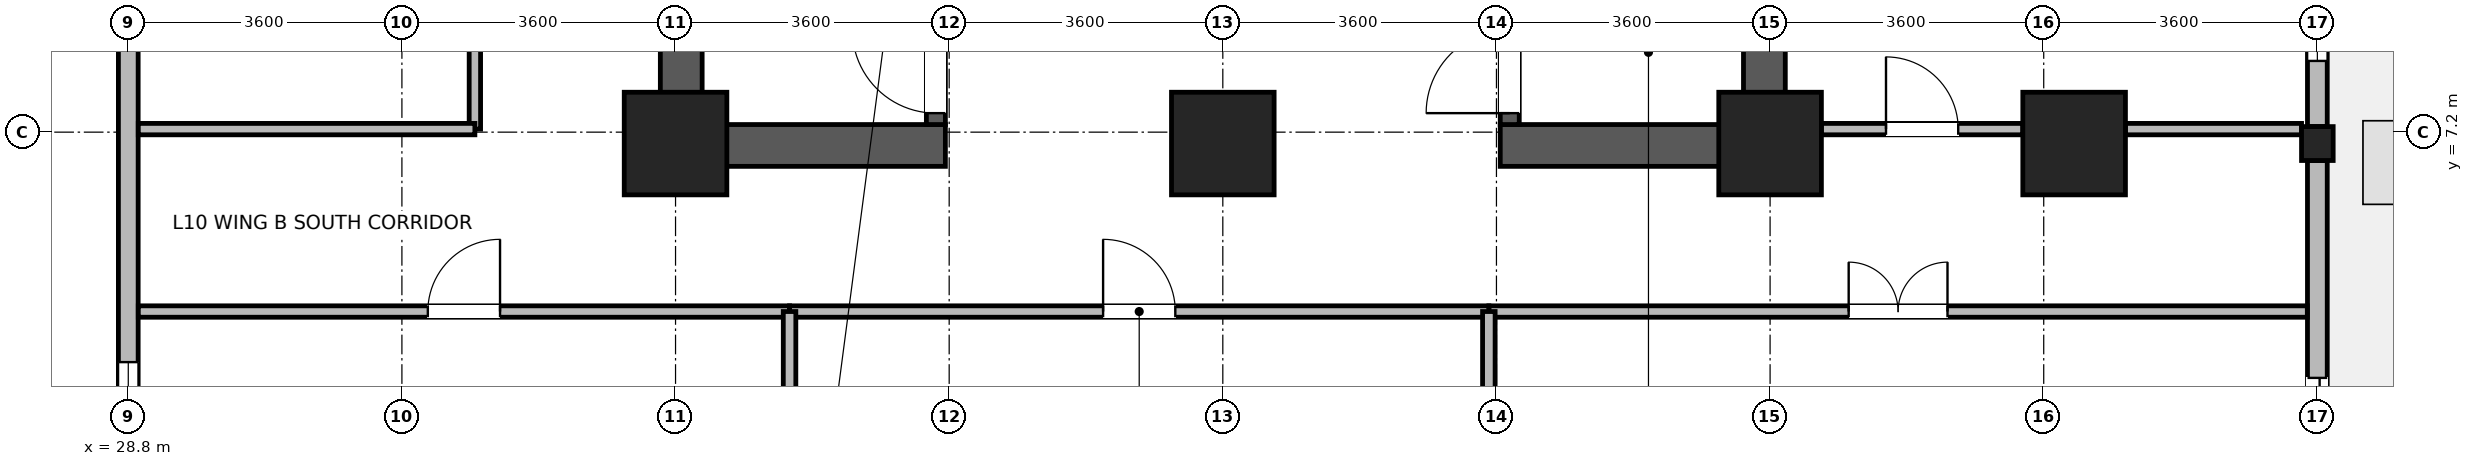
"""IFC4 building model, lengths in metres.
Left out: names, types, materials, properties, quantities, classifications, styles, units other than length and angle.
Written with IfcOpenShell. Run it as: python <this file> out.ifc"""

import sys

from ifc_helpers import new_model, si_unit, direction, frame, frame_2d, origin, origin_2d, place, context, subcontext, project, spatial, rectangle, i_section, extrude, source, transform, mapped, element, fill, save


model = new_model("IFC4")
c1 = context("Model", 3, precision=1e-05, world=origin(), true_north=direction((0.0, 1.0)))
c2 = subcontext(c1, "Body", "Model", "MODEL_VIEW")
j1 = project(units=[si_unit("LENGTHUNIT", "METRE"), si_unit("PLANEANGLEUNIT", "RADIAN")], contexts=[c1])
p1 = place(None, origin())
s1 = spatial("IfcSite", under=j1, at=p1, CompositionType="ELEMENT")
p2 = place(p1, origin())
s2 = spatial("IfcBuilding", under=s1, at=p2, CompositionType="ELEMENT")
p3 = place(p2, frame((0.0, 0.0, 43.8)))
s3 = spatial("IfcBuildingStorey", under=s2, at=p3, CompositionType="ELEMENT", Elevation=43.8)
for number, where, z_axis, x_axis in (
    (1, (36.075, 6.75, 0.0), (0.0, 0.0, 1.0), (0.0, 1.0, 0.0)),
    (2, (50.325, 6.75, 0.0), (0.0, 0.0, 1.0), (0.0, 1.0, 0.0)),
):
    element("IfcWall", number, at=place(p3, frame(where, z_axis=z_axis, x_axis=x_axis)), inside=s3, PredefinedType="SHEAR", context=c2, shape_type="SweptSolid", body=[
        extrude(rectangle(XDim=8.1, YDim=0.55, at=frame_2d((4.05, 0.0))), origin(), (0.0, 0.0, 1.0), 3.45),
    ])
for number, where, z_axis, x_axis in (
    (3, (36.35, 7.025, 0.0), (0.0, 0.0, 1.0), (1.0, 0.0, 0.0)),
    (4, (46.85, 7.025, 0.0), (0.0, 0.0, 1.0), (1.0, 0.0, 0.0)),
):
    element("IfcWall", number, at=place(p3, frame(where, z_axis=z_axis, x_axis=x_axis)), inside=s3, PredefinedType="SHEAR", context=c2, shape_type="SweptSolid", body=[
        extrude(rectangle(XDim=3.2, YDim=0.55, at=frame_2d((1.6, 0.0))), origin(), (0.0, 0.0, 1.0), 3.45),
    ])
p4 = place(p3, frame((39.425, 7.3, 0.0), z_axis=(0.0, 0.0, 1.0), x_axis=(0.0, 1.0, 0.0)))
e5 = element("IfcWall", 5, at=p4, inside=s3, PredefinedType="SHEAR", context=c2, shape_type="SweptSolid", body=[
    extrude(rectangle(XDim=7.0, YDim=0.25, at=frame_2d((3.5, 0.0))), origin(), (0.0, 0.0, 1.0), 3.45),
])
p5 = place(p4, frame((0.15, 0.0, 0.0)))
e6 = element("IfcOpeningElement", 6, at=p5, cuts=e5, PredefinedType="OPENING", context=c2, shape_type="SweptSolid", body=[
    extrude(rectangle(XDim=1.1, YDim=2.08, at=frame_2d((0.55, 1.04))), frame((0.0, 0.135, 0.0), z_axis=(0.0, -1.0, 0.0), x_axis=(1.0, 0.0, 0.0)), (0.0, 0.0, 1.0), 0.27),
])
p6 = place(p3, frame((46.975, 7.3, 0.0), z_axis=(0.0, 0.0, 1.0), x_axis=(0.0, 1.0, 0.0)))
e7 = element("IfcWall", 7, at=p6, inside=s3, PredefinedType="SHEAR", context=c2, shape_type="SweptSolid", body=[
    extrude(rectangle(XDim=7.0, YDim=0.25, at=frame_2d((3.5, 0.0))), origin(), (0.0, 0.0, 1.0), 3.45),
])
p7 = place(p6, frame((0.15, 0.0, 0.0)))
e8 = element("IfcOpeningElement", 8, at=p7, cuts=e7, PredefinedType="OPENING", context=c2, shape_type="SweptSolid", body=[
    extrude(rectangle(XDim=1.1, YDim=2.08, at=frame_2d((0.55, 1.04))), frame((0.0, 0.135, 0.0), z_axis=(0.0, -1.0, 0.0), x_axis=(1.0, 0.0, 0.0)), (0.0, 0.0, 1.0), 0.27),
])
m1 = source(origin(), c2, "Body", "SweptSolid", [
    extrude(rectangle(XDim=1.35, YDim=1.35, at=origin_2d()), origin(), (0.0, 0.0, 1.0), 3.7),
])
for number, where, z_axis, x_axis in (
    (9, (36.0, 7.05, 0.0), (0.0, 0.0, 1.0), (1.0, 0.0, 0.0)),
    (10, (43.2, 7.05, 0.0), (0.0, 0.0, 1.0), (1.0, 0.0, 0.0)),
    (11, (50.4, 7.05, 0.0), (0.0, 0.0, 1.0), (1.0, 0.0, 0.0)),
    (12, (54.4, 7.05, 0.0), (0.0, 0.0, 1.0), (1.0, 0.0, 0.0)),
):
    element("IfcColumn", number, at=place(p3, frame(where, z_axis=z_axis, x_axis=x_axis)), inside=s3, PredefinedType="COLUMN", context=c2, shape_type="MappedRepresentation", body=[
        mapped(m1, transform((0.0, 0.0, 0.0), x_axis=(1.0, 0.0, 0.0), y_axis=(0.0, 1.0, 0.0), z_axis=(0.0, 0.0, 1.0), scale=1.0)),
    ])
m2 = source(origin(), c2, "Body", "SweptSolid", [
    extrude(i_section(OverallWidth=0.416, OverallDepth=0.446, WebThickness=0.029, FlangeThickness=0.04, FilletRadius=0.015, at=origin_2d()), origin(), (0.0, 0.0, 1.0), 3.7),
])
p8 = place(p3, frame((57.6, 7.05, 0.0), z_axis=(0.0, 0.0, 1.0), x_axis=(1.0, 0.0, 0.0)))
e13 = element("IfcColumn", 13, at=p8, inside=s3, PredefinedType="COLUMN", context=c2, shape_type="MappedRepresentation", body=[
    mapped(m2, transform((0.0, 0.0, 0.0), x_axis=(1.0, 0.0, 0.0), y_axis=(0.0, 1.0, 0.0), z_axis=(0.0, 0.0, 1.0), scale=1.0)),
])
p9 = place(p3, frame((57.6, 6.826, 0.0), z_axis=(0.0, 0.0, 1.0), x_axis=(0.0, -1.0, 0.0)))
e14 = element("IfcWall", 14, at=p9, inside=s3, PredefinedType="STANDARD", context=c2, shape_type="SweptSolid", body=[
    extrude(rectangle(XDim=5.156, YDim=0.26, at=frame_2d((2.578, 0.0))), origin(), (0.0, 0.0, 1.0), 3.43),
])
p10 = place(p9, frame((2.859, 0.0, 0.0)))
e15 = element("IfcOpeningElement", 15, at=p10, cuts=e14, PredefinedType="OPENING", context=c2, shape_type="SweptSolid", body=[
    extrude(rectangle(XDim=1.5, YDim=2.15, at=frame_2d((0.75, 1.075))), frame((0.0, 0.14, 0.0), z_axis=(0.0, -1.0, 0.0), x_axis=(1.0, 0.0, 0.0)), (0.0, 0.0, 1.0), 0.28),
])
p11 = place(p3, frame((57.6, 14.326, 0.0), z_axis=(0.0, 0.0, 1.0), x_axis=(0.0, -1.0, 0.0)))
e16 = element("IfcWall", 16, at=p11, inside=s3, PredefinedType="STANDARD", context=c2, shape_type="SweptSolid", body=[
    extrude(rectangle(XDim=7.052, YDim=0.26, at=frame_2d((3.526, 0.0))), origin(), (0.0, 0.0, 1.0), 2.93),
])
p12 = place(p11, frame((0.863, 0.0, 0.85)))
e17 = element("IfcOpeningElement", 17, at=p12, cuts=e16, PredefinedType="OPENING", context=c2, shape_type="SweptSolid", body=[
    extrude(rectangle(XDim=1.8, YDim=1.85, at=frame_2d((0.9, 0.925))), frame((0.0, 0.14, 0.0), z_axis=(0.0, -1.0, 0.0), x_axis=(1.0, 0.0, 0.0)), (0.0, 0.0, 1.0), 0.28),
])
p13 = place(p11, frame((4.389, 0.0, 0.85)))
e18 = element("IfcOpeningElement", 18, at=p13, cuts=e16, PredefinedType="OPENING", context=c2, shape_type="SweptSolid", body=[
    extrude(rectangle(XDim=1.8, YDim=1.85, at=frame_2d((0.9, 0.925))), frame((0.0, 0.14, 0.0), z_axis=(0.0, -1.0, 0.0), x_axis=(1.0, 0.0, 0.0)), (0.0, 0.0, 1.0), 0.28),
])
p14 = place(p3, frame((28.8, 1.67, 0.0), z_axis=(0.0, 0.0, 1.0), x_axis=(0.0, 1.0, 0.0)))
e19 = element("IfcWall", 19, at=p14, inside=s3, PredefinedType="STANDARD", context=c2, shape_type="SweptSolid", body=[
    extrude(rectangle(XDim=19.254, YDim=0.26, at=frame_2d((9.627, 0.0))), origin(), (0.0, 0.0, 1.0), 3.43),
])
p15 = place(p14, frame((0.705, 0.0, 0.85)))
e20 = element("IfcOpeningElement", 20, at=p15, cuts=e19, PredefinedType="OPENING", context=c2, shape_type="SweptSolid", body=[
    extrude(rectangle(XDim=1.8, YDim=1.85, at=frame_2d((0.9, 0.925))), frame((0.0, 0.14, 0.0), z_axis=(0.0, -1.0, 0.0), x_axis=(1.0, 0.0, 0.0)), (0.0, 0.0, 1.0), 0.28),
])
p16 = place(p14, frame((7.123, 0.0, 0.85)))
e21 = element("IfcOpeningElement", 21, at=p16, cuts=e19, PredefinedType="OPENING", context=c2, shape_type="SweptSolid", body=[
    extrude(rectangle(XDim=1.8, YDim=1.85, at=frame_2d((0.9, 0.925))), frame((0.0, 0.14, 0.0), z_axis=(0.0, -1.0, 0.0), x_axis=(1.0, 0.0, 0.0)), (0.0, 0.0, 1.0), 0.28),
])
p17 = place(p14, frame((10.332, 0.0, 0.85)))
e22 = element("IfcOpeningElement", 22, at=p17, cuts=e19, PredefinedType="OPENING", context=c2, shape_type="SweptSolid", body=[
    extrude(rectangle(XDim=1.8, YDim=1.85, at=frame_2d((0.9, 0.925))), frame((0.0, 0.14, 0.0), z_axis=(0.0, -1.0, 0.0), x_axis=(1.0, 0.0, 0.0)), (0.0, 0.0, 1.0), 0.28),
])
p18 = place(p14, frame((13.541, 0.0, 0.85)))
e23 = element("IfcOpeningElement", 23, at=p18, cuts=e19, PredefinedType="OPENING", context=c2, shape_type="SweptSolid", body=[
    extrude(rectangle(XDim=1.8, YDim=1.85, at=frame_2d((0.9, 0.925))), frame((0.0, 0.14, 0.0), z_axis=(0.0, -1.0, 0.0), x_axis=(1.0, 0.0, 0.0)), (0.0, 0.0, 1.0), 0.28),
])
p19 = place(p14, frame((16.75, 0.0, 0.85)))
e24 = element("IfcOpeningElement", 24, at=p19, cuts=e19, PredefinedType="OPENING", context=c2, shape_type="SweptSolid", body=[
    extrude(rectangle(XDim=1.8, YDim=1.85, at=frame_2d((0.9, 0.925))), frame((0.0, 0.14, 0.0), z_axis=(0.0, -1.0, 0.0), x_axis=(1.0, 0.0, 0.0)), (0.0, 0.0, 1.0), 0.28),
])
p20 = place(p3, frame((46.7, 4.84, 0.0), z_axis=(0.0, 0.0, 1.0), x_axis=(1.0, 0.0, 0.0)))
e25 = element("IfcWall", 25, at=p20, inside=s3, PredefinedType="PARTITIONING", context=c2, shape_type="SweptSolid", body=[
    extrude(rectangle(XDim=10.768, YDim=0.15, at=frame_2d((5.384, 0.0))), origin(), (0.0, 0.0, 1.0), 3.43),
])
p21 = place(p20, frame((4.734, 0.0, 0.0)))
e26 = element("IfcOpeningElement", 26, at=p21, cuts=e25, PredefinedType="OPENING", context=c2, shape_type="SweptSolid", body=[
    extrude(rectangle(XDim=1.3, YDim=2.12, at=frame_2d((0.65, 1.06))), frame((0.0, 0.085, 0.0), z_axis=(0.0, -1.0, 0.0), x_axis=(1.0, 0.0, 0.0)), (0.0, 0.0, 1.0), 0.17),
])
p22 = place(p3, frame((37.5, 4.84, 0.0), z_axis=(0.0, 0.0, 1.0), x_axis=(1.0, 0.0, 0.0)))
e27 = element("IfcWall", 27, at=p22, inside=s3, PredefinedType="PARTITIONING", context=c2, shape_type="SweptSolid", body=[
    extrude(rectangle(XDim=9.2, YDim=0.15, at=frame_2d((4.6, 0.0))), origin(), (0.0, 0.0, 1.0), 3.43),
])
p23 = place(p22, frame((4.125, 0.0, 0.0)))
e28 = element("IfcOpeningElement", 28, at=p23, cuts=e27, PredefinedType="OPENING", context=c2, shape_type="SweptSolid", body=[
    extrude(rectangle(XDim=0.95, YDim=2.1, at=frame_2d((0.475, 1.05))), frame((0.0, 0.085, 0.0), z_axis=(0.0, -1.0, 0.0), x_axis=(1.0, 0.0, 0.0)), (0.0, 0.0, 1.0), 0.17),
])
p24 = place(p3, frame((28.932, 4.84, 0.0), z_axis=(0.0, 0.0, 1.0), x_axis=(1.0, 0.0, 0.0)))
e29 = element("IfcWall", 29, at=p24, inside=s3, PredefinedType="PARTITIONING", context=c2, shape_type="SweptSolid", body=[
    extrude(rectangle(XDim=8.568, YDim=0.15, at=frame_2d((4.284, 0.0))), origin(), (0.0, 0.0, 1.0), 3.43),
])
p25 = place(p24, frame((3.809, 0.0, 0.0)))
e30 = element("IfcOpeningElement", 30, at=p25, cuts=e29, PredefinedType="OPENING", context=c2, shape_type="SweptSolid", body=[
    extrude(rectangle(XDim=0.95, YDim=2.1, at=frame_2d((0.475, 1.05))), frame((0.0, 0.085, 0.0), z_axis=(0.0, -1.0, 0.0), x_axis=(1.0, 0.0, 0.0)), (0.0, 0.0, 1.0), 0.17),
])
p26 = place(p3, frame((33.36, 7.24, 0.0), z_axis=(0.0, 0.0, 1.0), x_axis=(0.0, 1.0, 0.0)))
e31 = element("IfcWall", 31, at=p26, inside=s3, PredefinedType="PARTITIONING", context=c2, shape_type="SweptSolid", body=[
    extrude(rectangle(XDim=7.26, YDim=0.15, at=frame_2d((3.63, 0.0))), origin(), (0.0, 0.0, 1.0), 3.43),
])
p27 = place(p26, frame((2.98, 0.0, 0.0)))
e32 = element("IfcOpeningElement", 32, at=p27, cuts=e31, PredefinedType="OPENING", context=c2, shape_type="SweptSolid", body=[
    extrude(rectangle(XDim=1.3, YDim=2.12, at=frame_2d((0.65, 1.06))), frame((0.0, 0.085, 0.0), z_axis=(0.0, -1.0, 0.0), x_axis=(1.0, 0.0, 0.0)), (0.0, 0.0, 1.0), 0.17),
])
p28 = place(p3, frame((51.075, 7.24, 0.0), z_axis=(0.0, 0.0, 1.0), x_axis=(1.0, 0.0, 0.0)))
e33 = element("IfcWall", 33, at=p28, inside=s3, PredefinedType="PARTITIONING", context=c2, shape_type="SweptSolid", body=[
    extrude(rectangle(XDim=2.65, YDim=0.15, at=frame_2d((1.325, 0.0))), origin(), (0.0, 0.0, 1.0), 2.78),
])
p29 = place(p28, frame((0.85, 0.0, 0.0)))
e34 = element("IfcOpeningElement", 34, at=p29, cuts=e33, PredefinedType="OPENING", context=c2, shape_type="SweptSolid", body=[
    extrude(rectangle(XDim=0.95, YDim=2.1, at=frame_2d((0.475, 1.05))), frame((0.0, 0.085, 0.0), z_axis=(0.0, -1.0, 0.0), x_axis=(1.0, 0.0, 0.0)), (0.0, 0.0, 1.0), 0.17),
])
p30 = place(p3, frame((55.075, 7.24, 0.0), z_axis=(0.0, 0.0, 1.0), x_axis=(1.0, 0.0, 0.0)))
e35 = element("IfcWall", 35, at=p30, inside=s3, PredefinedType="PARTITIONING", context=c2, shape_type="SweptSolid", body=[
    extrude(rectangle(XDim=2.317, YDim=0.15, at=frame_2d((1.159, 0.0))), origin(), (0.0, 0.0, 1.0), 2.78),
])
p31 = place(p3, frame((28.932, 7.24, 0.0), z_axis=(0.0, 0.0, 1.0), x_axis=(1.0, 0.0, 0.0)))
e36 = element("IfcWall", 36, at=p31, inside=s3, PredefinedType="PARTITIONING", context=c2, shape_type="SweptSolid", body=[
    extrude(rectangle(XDim=4.428, YDim=0.15, at=frame_2d((2.214, 0.0))), origin(), (0.0, 0.0, 1.0), 3.43),
])
for number, where, z_axis, x_axis in (
    (37, (37.5, 1.932, 0.0), (0.0, 0.0, 1.0), (0.0, 1.0, 0.0)),
    (38, (46.7, 1.932, 0.0), (0.0, 0.0, 1.0), (0.0, 1.0, 0.0)),
):
    element("IfcWall", number, at=place(p3, frame(where, z_axis=z_axis, x_axis=x_axis)), inside=s3, PredefinedType="PARTITIONING", context=c2, shape_type="SweptSolid", body=[
        extrude(rectangle(XDim=2.908, YDim=0.165, at=frame_2d((1.454, 0.0))), origin(), (0.0, 0.0, 1.0), 3.43),
    ])
p32 = place(p10, origin())
e39 = element("IfcDoor", 39, at=p32, inside=s3, OperationType="SLIDING_TO_LEFT", PredefinedType="DOOR", context=c2, shape_type="SweptSolid", body=[
    extrude(rectangle(XDim=1.5, YDim=2.15, at=frame_2d((0.75, 1.075))), frame((0.0, 0.025, 0.0), z_axis=(0.0, -1.0, 0.0), x_axis=(1.0, 0.0, 0.0)), (0.0, 0.0, 1.0), 0.05),
])
fill(e15, e39)
p33 = place(p13, origin())
e40 = element("IfcWindow", 40, at=p33, inside=s3, PartitioningType="SINGLE_PANEL", PredefinedType="WINDOW", context=c2, shape_type="SweptSolid", body=[
    extrude(rectangle(XDim=1.8, YDim=1.85, at=frame_2d((0.9, 0.925))), frame((0.0, 0.03, 0.0), z_axis=(0.0, -1.0, 0.0), x_axis=(1.0, 0.0, 0.0)), (0.0, 0.0, 1.0), 0.06),
])
fill(e18, e40)
p34 = place(p15, origin())
e41 = element("IfcWindow", 41, at=p34, inside=s3, PartitioningType="SINGLE_PANEL", PredefinedType="WINDOW", context=c2, shape_type="SweptSolid", body=[
    extrude(rectangle(XDim=1.8, YDim=1.85, at=frame_2d((0.9, 0.925))), frame((0.0, 0.03, 0.0), z_axis=(0.0, -1.0, 0.0), x_axis=(1.0, 0.0, 0.0)), (0.0, 0.0, 1.0), 0.06),
])
fill(e20, e41)
p35 = place(p5, origin())
e42 = element("IfcDoor", 42, at=p35, inside=s3, OperationType="SINGLE_SWING_RIGHT", PredefinedType="DOOR", context=c2, shape_type="SweptSolid", body=[
    extrude(rectangle(XDim=1.1, YDim=2.08, at=frame_2d((0.55, 1.04))), frame((0.0, 0.025, 0.0), z_axis=(0.0, -1.0, 0.0), x_axis=(1.0, 0.0, 0.0)), (0.0, 0.0, 1.0), 0.05),
])
fill(e6, e42)
p36 = place(p7, origin())
e43 = element("IfcDoor", 43, at=p36, inside=s3, OperationType="SINGLE_SWING_LEFT", PredefinedType="DOOR", context=c2, shape_type="SweptSolid", body=[
    extrude(rectangle(XDim=1.1, YDim=2.08, at=frame_2d((0.55, 1.04))), frame((0.0, 0.025, 0.0), z_axis=(0.0, -1.0, 0.0), x_axis=(1.0, 0.0, 0.0)), (0.0, 0.0, 1.0), 0.05),
])
fill(e8, e43)
p37 = place(p21, origin())
e44 = element("IfcDoor", 44, at=p37, inside=s3, OperationType="DOUBLE_DOOR_SINGLE_SWING", PredefinedType="DOOR", context=c2, shape_type="SweptSolid", body=[
    extrude(rectangle(XDim=1.3, YDim=2.12, at=frame_2d((0.65, 1.06))), frame((0.0, 0.025, 0.0), z_axis=(0.0, -1.0, 0.0), x_axis=(1.0, 0.0, 0.0)), (0.0, 0.0, 1.0), 0.05),
])
fill(e26, e44)
p38 = place(p23, origin())
e45 = element("IfcDoor", 45, at=p38, inside=s3, OperationType="SINGLE_SWING_LEFT", PredefinedType="DOOR", context=c2, shape_type="SweptSolid", body=[
    extrude(rectangle(XDim=0.95, YDim=2.1, at=frame_2d((0.475, 1.05))), frame((0.0, 0.025, 0.0), z_axis=(0.0, -1.0, 0.0), x_axis=(1.0, 0.0, 0.0)), (0.0, 0.0, 1.0), 0.05),
])
fill(e28, e45)
p39 = place(p25, origin())
e46 = element("IfcDoor", 46, at=p39, inside=s3, OperationType="SINGLE_SWING_RIGHT", PredefinedType="DOOR", context=c2, shape_type="SweptSolid", body=[
    extrude(rectangle(XDim=0.95, YDim=2.1, at=frame_2d((0.475, 1.05))), frame((0.0, 0.025, 0.0), z_axis=(0.0, -1.0, 0.0), x_axis=(1.0, 0.0, 0.0)), (0.0, 0.0, 1.0), 0.05),
])
fill(e30, e46)
p40 = place(p29, origin())
e47 = element("IfcDoor", 47, at=p40, inside=s3, OperationType="SINGLE_SWING_LEFT", PredefinedType="DOOR", context=c2, shape_type="SweptSolid", body=[
    extrude(rectangle(XDim=0.95, YDim=2.1, at=frame_2d((0.475, 1.05))), frame((0.0, 0.025, 0.0), z_axis=(0.0, -1.0, 0.0), x_axis=(1.0, 0.0, 0.0)), (0.0, 0.0, 1.0), 0.05),
])
fill(e34, e47)
save(model, sys.argv[1])
